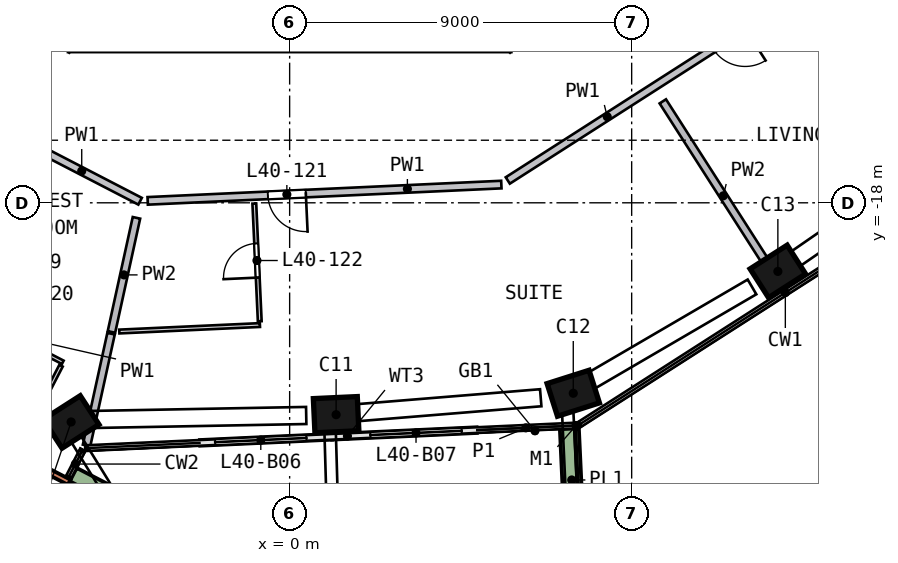
"""IFC4 building model, lengths in metres.
Left out: names, types, materials, properties, quantities, classifications, styles, units other than length and angle.
Written with IfcOpenShell. Run it as: python <this file> out.ifc"""

import sys

from ifc_helpers import new_model, si_unit, direction, frame, frame_2d, origin, origin_2d, place, context, subcontext, project, spatial, rectangle, extrude, element, fill, save


model = new_model("IFC4")
c1 = context("Model", 3, precision=1e-05, world=origin(), true_north=direction((0.0, 1.0)))
c2 = subcontext(c1, "Body", "Model", "MODEL_VIEW")
j1 = project(units=[si_unit("LENGTHUNIT", "METRE"), si_unit("PLANEANGLEUNIT", "RADIAN")], contexts=[c1])
p1 = place(None, origin())
s1 = spatial("IfcSite", under=j1, at=p1, CompositionType="ELEMENT")
p2 = place(p1, origin())
s2 = spatial("IfcBuilding", under=s1, at=p2, CompositionType="ELEMENT")
p3 = place(p2, frame((0.0, 0.0, 165.5)))
s3 = spatial("IfcBuildingStorey", under=s2, at=p3, CompositionType="ELEMENT", Elevation=165.5)
p4 = place(p3, frame((-5.886, -23.735, 0.0), z_axis=(0.113078662, -0.027077449, 0.99321701), x_axis=(-0.835843281, -0.543055094, 0.080356551)))
e1 = element("IfcColumn", 1, at=p4, inside=s3, PredefinedType="COLUMN", context=c2, shape_type="SweptSolid", body=[
    extrude(rectangle(XDim=1.15, YDim=0.9, at=origin_2d()), origin(), (0.0, 0.0, 1.0), 3.021),
])
p5 = place(p3, frame((1.087, -23.583, 0.0), z_axis=(0.112159985, 0.006145753, 0.993671157), x_axis=(0.992608833, 0.045945291, -0.112324243)))
e2 = element("IfcColumn", 2, at=p5, inside=s3, PredefinedType="COLUMN", context=c2, shape_type="SweptSolid", body=[
    extrude(rectangle(XDim=1.15, YDim=0.9, at=origin_2d()), origin(), (0.0, 0.0, 1.0), 3.019),
])
p6 = place(p3, frame((7.331, -23.055, 0.0), z_axis=(0.109295901, 0.035812192, 0.993363928), x_axis=(-0.946573687, -0.301282406, 0.115009418)))
e3 = element("IfcColumn", 3, at=p6, inside=s3, PredefinedType="COLUMN", context=c2, shape_type="SweptSolid", body=[
    extrude(rectangle(XDim=1.15, YDim=0.9, at=origin_2d()), origin(), (0.0, 0.0, 1.0), 3.02),
])
p7 = place(p3, frame((12.733, -19.88, 0.0), z_axis=(0.094046929, 0.061296279, 0.993678993), x_axis=(0.837046934, 0.535491613, -0.112254901)))
e4 = element("IfcColumn", 4, at=p7, inside=s3, PredefinedType="COLUMN", context=c2, shape_type="SweptSolid", body=[
    extrude(rectangle(XDim=1.15, YDim=0.9, at=origin_2d()), origin(), (0.0, 0.0, 1.0), 3.019),
])
p8 = place(p3, frame((-7.466, -24.492, 0.0), z_axis=(0.0, 0.0, 1.0), x_axis=(0.888116855, -0.459617724, 0.0)))
e5 = element("IfcWall", 5, at=p8, inside=s3, PredefinedType="SOLIDWALL", context=c2, shape_type="SweptSolid", body=[
    extrude(rectangle(XDim=1.875, YDim=0.15, at=frame_2d((0.938, 0.0))), origin(), (0.0, 0.0, 1.0), 3.0),
])
p9 = place(p3, frame((-2.357, -24.318, 0.0), z_axis=(0.0, 0.0, 1.0), x_axis=(0.998940688, 0.046016327, 0.0)))
e6 = element("IfcWall", 6, at=p9, inside=s3, PredefinedType="SOLIDWALL", context=c2, shape_type="SweptSolid", body=[
    extrude(rectangle(XDim=3.475, YDim=0.15, at=frame_2d((1.738, 0.0))), origin(), (0.0, 0.0, 1.0), 2.935),
])
p10 = place(p9, frame((0.4, 0.0, 0.0)))
e7 = element("IfcOpeningElement", 7, at=p10, cuts=e6, PredefinedType="OPENING", context=c2, shape_type="SweptSolid", body=[
    extrude(rectangle(XDim=2.4, YDim=2.4, at=frame_2d((1.2, 1.2))), frame((0.0, 0.085, 0.0), z_axis=(0.0, -1.0, 0.0), x_axis=(1.0, 0.0, 0.0)), (0.0, 0.0, 1.0), 0.17),
])
p11 = place(p3, frame((1.114, -24.158, 0.0), z_axis=(0.0, 0.0, 1.0), x_axis=(0.99893729, 0.046090026, 0.0)))
e8 = element("IfcWall", 8, at=p11, inside=s3, PredefinedType="SOLIDWALL", context=c2, shape_type="SweptSolid", body=[
    extrude(rectangle(XDim=3.814, YDim=0.15, at=frame_2d((1.907, 0.0))), origin(), (0.0, 0.0, 1.0), 2.935),
])
p12 = place(p11, frame((1.014, 0.0, 0.0)))
e9 = element("IfcOpeningElement", 9, at=p12, cuts=e8, PredefinedType="OPENING", context=c2, shape_type="SweptSolid", body=[
    extrude(rectangle(XDim=2.4, YDim=2.4, at=frame_2d((1.2, 1.2))), frame((0.0, 0.085, 0.0), z_axis=(0.0, -1.0, 0.0), x_axis=(1.0, 0.0, 0.0)), (0.0, 0.0, 1.0), 0.17),
])
p13 = place(p3, frame((-5.719, -25.198, 0.0), z_axis=(0.0, 0.0, 1.0), x_axis=(0.888106482, -0.459637768, 0.0)))
e10 = element("IfcWall", 10, at=p13, inside=s3, PredefinedType="SOLIDWALL", context=c2, shape_type="SweptSolid", body=[
    extrude(rectangle(XDim=1.731, YDim=0.5, at=frame_2d((0.865, 0.0))), origin(), (0.0, 0.0, 1.0), 0.7),
])
p14 = place(p3, frame((7.485, -26.642, 0.0), z_axis=(0.0, 0.0, 1.0), x_axis=(-0.046043663, 0.998939428, 0.0)))
e11 = element("IfcWall", 11, at=p14, inside=s3, PredefinedType="SOLIDWALL", context=c2, shape_type="SweptSolid", body=[
    extrude(rectangle(XDim=2.699, YDim=0.5, at=frame_2d((1.35, 0.0))), origin(), (0.0, 0.0, 1.0), 0.7),
])
p15 = place(p3, frame((-7.007, -16.369, 0.0), z_axis=(0.0, 0.0, 1.0), x_axis=(0.88814313, -0.459566948, 0.0)))
e12 = element("IfcWall", 12, at=p15, inside=s3, PredefinedType="SOLIDWALL", context=c2, shape_type="SweptSolid", body=[
    extrude(rectangle(XDim=3.458, YDim=0.2, at=frame_2d((1.729, 0.0))), origin(), (0.0, 0.0, 1.0), 3.0),
])
p16 = place(p3, frame((5.571, -17.52, 0.0), z_axis=(0.0, 0.0, 1.0), x_axis=(-0.998938225, -0.046069766, 0.0)))
e13 = element("IfcWall", 13, at=p16, inside=s3, PredefinedType="SOLIDWALL", context=c2, shape_type="SweptSolid", body=[
    extrude(rectangle(XDim=9.316, YDim=0.2, at=frame_2d((4.658, 0.0))), origin(), (0.0, 0.0, 1.0), 3.0),
])
p17 = place(p16, frame((5.15, 0.0, 0.0)))
e14 = element("IfcOpeningElement", 14, at=p17, cuts=e13, PredefinedType="OPENING", context=c2, shape_type="SweptSolid", body=[
    extrude(rectangle(XDim=1.0, YDim=2.1, at=frame_2d((0.5, 1.05))), frame((0.0, 0.11, 0.0), z_axis=(0.0, -1.0, 0.0), x_axis=(1.0, 0.0, 0.0)), (0.0, 0.0, 1.0), 0.22),
])
p18 = place(p3, frame((13.585, -12.387, 0.0), z_axis=(0.0, 0.0, 1.0), x_axis=(-0.842082403, -0.539348892, 0.0)))
e15 = element("IfcWall", 15, at=p18, inside=s3, PredefinedType="SOLIDWALL", context=c2, shape_type="SweptSolid", body=[
    extrude(rectangle(XDim=9.316, YDim=0.2, at=frame_2d((4.658, 0.0))), origin(), (0.0, 0.0, 1.0), 3.0),
])
p19 = place(p18, frame((1.9, 0.0, 0.0)))
e16 = element("IfcOpeningElement", 16, at=p19, cuts=e15, PredefinedType="OPENING", context=c2, shape_type="SweptSolid", body=[
    extrude(rectangle(XDim=1.0, YDim=2.1, at=frame_2d((0.5, 1.05))), frame((0.0, 0.11, 0.0), z_axis=(0.0, -1.0, 0.0), x_axis=(1.0, 0.0, 0.0)), (0.0, 0.0, 1.0), 0.22),
])
p20 = place(p3, frame((-4.699, -21.444, 0.0), z_axis=(0.0, 0.0, 1.0), x_axis=(-0.214028103, -0.976827503, 0.0)))
e17 = element("IfcWall", 17, at=p20, inside=s3, PredefinedType="SOLIDWALL", context=c2, shape_type="SweptSolid", body=[
    extrude(rectangle(XDim=3.011, YDim=0.2, at=frame_2d((1.506, 0.0))), origin(), (0.0, 0.0, 1.0), 3.0),
])
p21 = place(p3, frame((-4.031, -18.396, 0.0), z_axis=(0.0, 0.0, 1.0), x_axis=(-0.214071013, -0.976818101, 0.0)))
e18 = element("IfcWall", 18, at=p21, inside=s3, PredefinedType="SOLIDWALL", context=c2, shape_type="SweptSolid", body=[
    extrude(rectangle(XDim=3.075, YDim=0.2, at=frame_2d((1.537, 0.0))), origin(), (0.0, 0.0, 1.0), 3.0),
])
p22 = place(p3, frame((9.819, -15.331, 0.0), z_axis=(0.0, 0.0, 1.0), x_axis=(0.539354132, -0.842079047, 0.0)))
e19 = element("IfcWall", 19, at=p22, inside=s3, PredefinedType="SOLIDWALL", context=c2, shape_type="SweptSolid", body=[
    extrude(rectangle(XDim=5.903, YDim=0.2, at=frame_2d((2.951, 0.0))), origin(), (0.0, 0.0, 1.0), 3.0),
])
p23 = place(p3, frame((-5.969, -22.198, 0.0), z_axis=(0.0, 0.0, 1.0), x_axis=(-0.888128879, 0.459594488, 0.0)))
e20 = element("IfcWall", 20, at=p23, inside=s3, PredefinedType="PARTITIONING", context=c2, shape_type="SweptSolid", body=[
    extrude(rectangle(XDim=3.6, YDim=0.1, at=frame_2d((1.8, 0.0))), origin(), (0.0, 0.0, 1.0), 3.0),
])
p24 = place(p23, frame((1.4, 0.0, 0.0)))
e21 = element("IfcOpeningElement", 21, at=p24, cuts=e20, PredefinedType="OPENING", context=c2, shape_type="SweptSolid", body=[
    extrude(rectangle(XDim=1.0, YDim=2.1, at=frame_2d((0.5, 1.05))), frame((0.0, 0.06, 0.0), z_axis=(0.0, -1.0, 0.0), x_axis=(1.0, 0.0, 0.0)), (0.0, 0.0, 1.0), 0.12),
])
p25 = place(p3, frame((-6.015, -22.287, 0.0), z_axis=(0.0, 0.0, 1.0), x_axis=(-0.459654713, -0.888097712, 0.0)))
e22 = element("IfcWall", 22, at=p25, inside=s3, PredefinedType="PARTITIONING", context=c2, shape_type="SweptSolid", body=[
    extrude(rectangle(XDim=2.55, YDim=0.1, at=frame_2d((1.275, 0.0))), origin(), (0.0, 0.0, 1.0), 3.0),
])
p26 = place(p3, frame((-0.782, -21.217, 0.0), z_axis=(0.0, 0.0, 1.0), x_axis=(-0.998938011, -0.046074409, 0.0)))
e23 = element("IfcWall", 23, at=p26, inside=s3, PredefinedType="PARTITIONING", context=c2, shape_type="SweptSolid", body=[
    extrude(rectangle(XDim=3.704, YDim=0.1, at=frame_2d((1.852, 0.0))), origin(), (0.0, 0.0, 1.0), 3.0),
])
p27 = place(p3, frame((-0.787, -21.117, 0.0), z_axis=(0.0, 0.0, 1.0), x_axis=(-0.045993533, 0.998941737, 0.0)))
e24 = element("IfcWall", 24, at=p27, inside=s3, PredefinedType="PARTITIONING", context=c2, shape_type="SweptSolid", body=[
    extrude(rectangle(XDim=3.1, YDim=0.1, at=frame_2d((1.55, 0.0))), origin(), (0.0, 0.0, 1.0), 3.0),
])
p28 = place(p27, frame((1.15, 0.0, 0.0)))
e25 = element("IfcOpeningElement", 25, at=p28, cuts=e24, PredefinedType="OPENING", context=c2, shape_type="SweptSolid", body=[
    extrude(rectangle(XDim=0.9, YDim=2.1, at=frame_2d((0.45, 1.05))), frame((0.0, 0.06, 0.0), z_axis=(0.0, -1.0, 0.0), x_axis=(1.0, 0.0, 0.0)), (0.0, 0.0, 1.0), 0.12),
])
p29 = place(p3, frame((13.662, -12.457, 0.0), z_axis=(0.0, 0.0, 1.0), x_axis=(0.738912228, -0.673801691, 0.0)))
e26 = element("IfcWall", 26, at=p29, inside=s3, PredefinedType="PARTITIONING", context=c2, shape_type="SweptSolid", body=[
    extrude(rectangle(XDim=6.476, YDim=0.1, at=frame_2d((3.238, 0.0))), origin(), (0.0, 0.0, 1.0), 3.0),
])
p30 = place(p29, frame((3.55, 0.0, 0.0)))
e27 = element("IfcOpeningElement", 27, at=p30, cuts=e26, PredefinedType="OPENING", context=c2, shape_type="SweptSolid", body=[
    extrude(rectangle(XDim=1.0, YDim=2.1, at=frame_2d((0.5, 1.05))), frame((0.0, 0.06, 0.0), z_axis=(0.0, -1.0, 0.0), x_axis=(1.0, 0.0, 0.0)), (0.0, 0.0, 1.0), 0.12),
])
p31 = place(p10, origin())
e28 = element("IfcDoor", 28, at=p31, inside=s3, OperationType="SLIDING_TO_RIGHT", PredefinedType="DOOR", context=c2, shape_type="SweptSolid", body=[
    extrude(rectangle(XDim=2.4, YDim=2.4, at=frame_2d((1.2, 1.2))), frame((0.0, 0.025, 0.0), z_axis=(0.0, -1.0, 0.0), x_axis=(1.0, 0.0, 0.0)), (0.0, 0.0, 1.0), 0.05),
])
fill(e7, e28)
p32 = place(p12, origin())
e29 = element("IfcDoor", 29, at=p32, inside=s3, OperationType="SLIDING_TO_LEFT", PredefinedType="DOOR", context=c2, shape_type="SweptSolid", body=[
    extrude(rectangle(XDim=2.4, YDim=2.4, at=frame_2d((1.2, 1.2))), frame((0.0, 0.025, 0.0), z_axis=(0.0, -1.0, 0.0), x_axis=(1.0, 0.0, 0.0)), (0.0, 0.0, 1.0), 0.05),
])
fill(e9, e29)
p33 = place(p17, origin())
e30 = element("IfcDoor", 30, at=p33, inside=s3, OperationType="SINGLE_SWING_LEFT", PredefinedType="DOOR", context=c2, shape_type="SweptSolid", body=[
    extrude(rectangle(XDim=1.0, YDim=2.1, at=frame_2d((0.5, 1.05))), frame((0.0, 0.025, 0.0), z_axis=(0.0, -1.0, 0.0), x_axis=(1.0, 0.0, 0.0)), (0.0, 0.0, 1.0), 0.05),
])
fill(e14, e30)
p34 = place(p28, origin())
e31 = element("IfcDoor", 31, at=p34, inside=s3, OperationType="SINGLE_SWING_LEFT", PredefinedType="DOOR", context=c2, shape_type="SweptSolid", body=[
    extrude(rectangle(XDim=0.9, YDim=2.1, at=frame_2d((0.45, 1.05))), frame((0.0, 0.025, 0.0), z_axis=(0.0, -1.0, 0.0), x_axis=(1.0, 0.0, 0.0)), (0.0, 0.0, 1.0), 0.05),
])
fill(e25, e31)
save(model, sys.argv[1])
